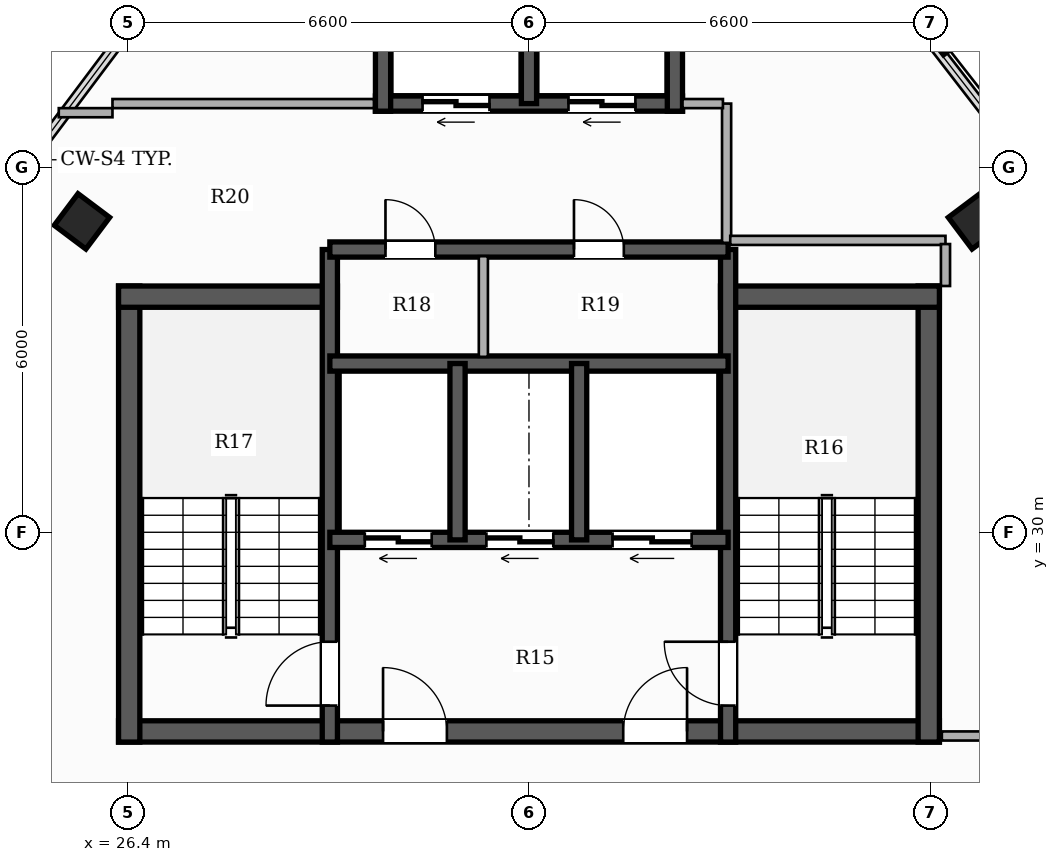
"""IFC4 building model, lengths in metres.
Left out: names, types, materials, properties, quantities, classifications, styles, units other than length and angle.
Written with IfcOpenShell. Run it as: python <this file> out.ifc"""

import sys

from ifc_helpers import new_model, si_unit, direction, frame, frame_2d, origin, origin_2d, place, context, subcontext, project, spatial, rectangle, hollow_rectangle, extrude, element, fill, save


model = new_model("IFC4")
c1 = context("Model", 3, precision=1e-05, world=origin(), true_north=direction((0.0, 1.0)))
c2 = subcontext(c1, "Body", "Model", "MODEL_VIEW")
j1 = project(units=[si_unit("LENGTHUNIT", "METRE"), si_unit("PLANEANGLEUNIT", "RADIAN")], contexts=[c1])
p1 = place(None, origin())
s1 = spatial("IfcSite", under=j1, at=p1, CompositionType="ELEMENT")
p2 = place(p1, origin())
s2 = spatial("IfcBuilding", under=s1, at=p2, CompositionType="ELEMENT")
p3 = place(p2, frame((0.0, 0.0, 260.15)))
s3 = spatial("IfcBuildingStorey", under=s2, at=p3, CompositionType="ELEMENT", Elevation=260.15)
p4 = place(p3, frame((26.25, 26.725, 0.0), z_axis=(0.0, 0.0, 1.0), x_axis=(1.0, 0.0, 0.0)))
e1 = element("IfcWall", 1, at=p4, inside=s3, PredefinedType="SHEAR", context=c2, shape_type="SweptSolid", body=[
    extrude(rectangle(XDim=13.5, YDim=0.35, at=frame_2d((6.75, 0.0))), origin(), (0.0, 0.0, 1.0), 3.3),
])
p5 = place(p4, frame((4.35, 0.0, 0.0)))
e2 = element("IfcOpeningElement", 2, at=p5, cuts=e1, PredefinedType="OPENING", context=c2, shape_type="SweptSolid", body=[
    extrude(rectangle(XDim=1.05, YDim=2.15, at=frame_2d((0.525, 1.075))), frame((0.0, 0.185, 0.0), z_axis=(0.0, -1.0, 0.0), x_axis=(1.0, 0.0, 0.0)), (0.0, 0.0, 1.0), 0.37),
])
p6 = place(p4, frame((8.3, 0.0, 0.0)))
e3 = element("IfcOpeningElement", 3, at=p6, cuts=e1, PredefinedType="OPENING", context=c2, shape_type="SweptSolid", body=[
    extrude(rectangle(XDim=1.05, YDim=2.15, at=frame_2d((0.525, 1.075))), frame((0.0, 0.185, 0.0), z_axis=(0.0, -1.0, 0.0), x_axis=(1.0, 0.0, 0.0)), (0.0, 0.0, 1.0), 0.37),
])
p7 = place(p3, frame((26.425, 26.55, 0.0), z_axis=(0.0, 0.0, 1.0), x_axis=(0.0, 1.0, 0.0)))
e4 = element("IfcWall", 4, at=p7, inside=s3, PredefinedType="SHEAR", context=c2, shape_type="SweptSolid", body=[
    extrude(rectangle(XDim=7.5, YDim=0.35, at=frame_2d((3.75, 0.0))), origin(), (0.0, 0.0, 1.0), 3.3),
])
p8 = place(p3, frame((26.25, 33.875, 0.0), z_axis=(0.0, 0.0, 1.0), x_axis=(1.0, 0.0, 0.0)))
e5 = element("IfcWall", 5, at=p8, inside=s3, PredefinedType="SHEAR", context=c2, shape_type="SweptSolid", body=[
    extrude(rectangle(XDim=3.6, YDim=0.35, at=frame_2d((1.8, 0.0))), origin(), (0.0, 0.0, 1.0), 3.3),
])
p9 = place(p3, frame((39.575, 26.55, 0.0), z_axis=(0.0, 0.0, 1.0), x_axis=(0.0, 1.0, 0.0)))
e6 = element("IfcWall", 6, at=p9, inside=s3, PredefinedType="SHEAR", context=c2, shape_type="SweptSolid", body=[
    extrude(rectangle(XDim=7.5, YDim=0.35, at=frame_2d((3.75, 0.0))), origin(), (0.0, 0.0, 1.0), 3.3),
])
p10 = place(p3, frame((36.15, 33.875, 0.0), z_axis=(0.0, 0.0, 1.0), x_axis=(1.0, 0.0, 0.0)))
e7 = element("IfcWall", 7, at=p10, inside=s3, PredefinedType="SHEAR", context=c2, shape_type="SweptSolid", body=[
    extrude(rectangle(XDim=3.6, YDim=0.35, at=frame_2d((1.8, 0.0))), origin(), (0.0, 0.0, 1.0), 3.3),
])
p11 = place(p3, frame((29.725, 26.55, 0.0), z_axis=(0.0, 0.0, 1.0), x_axis=(0.0, 1.0, 0.0)))
e8 = element("IfcWall", 8, at=p11, inside=s3, PredefinedType="SHEAR", context=c2, shape_type="SweptSolid", body=[
    extrude(rectangle(XDim=8.1, YDim=0.25, at=frame_2d((4.05, 0.0))), origin(), (0.0, 0.0, 1.0), 3.3),
])
p12 = place(p11, frame((0.6, 0.0, 0.0)))
e9 = element("IfcOpeningElement", 9, at=p12, cuts=e8, PredefinedType="OPENING", context=c2, shape_type="SweptSolid", body=[
    extrude(rectangle(XDim=1.05, YDim=2.15, at=frame_2d((0.525, 1.075))), frame((0.0, 0.135, 0.0), z_axis=(0.0, -1.0, 0.0), x_axis=(1.0, 0.0, 0.0)), (0.0, 0.0, 1.0), 0.27),
])
p13 = place(p3, frame((36.275, 26.55, 0.0), z_axis=(0.0, 0.0, 1.0), x_axis=(0.0, 1.0, 0.0)))
e10 = element("IfcWall", 10, at=p13, inside=s3, PredefinedType="SHEAR", context=c2, shape_type="SweptSolid", body=[
    extrude(rectangle(XDim=8.1, YDim=0.25, at=frame_2d((4.05, 0.0))), origin(), (0.0, 0.0, 1.0), 3.3),
])
p14 = place(p13, frame((0.6, 0.0, 0.0)))
e11 = element("IfcOpeningElement", 11, at=p14, cuts=e10, PredefinedType="OPENING", context=c2, shape_type="SweptSolid", body=[
    extrude(rectangle(XDim=1.05, YDim=2.15, at=frame_2d((0.525, 1.075))), frame((0.0, 0.135, 0.0), z_axis=(0.0, -1.0, 0.0), x_axis=(1.0, 0.0, 0.0)), (0.0, 0.0, 1.0), 0.27),
])
p15 = place(p3, frame((36.275, 29.875, 0.0), z_axis=(0.0, 0.0, 1.0), x_axis=(-1.0, 0.0, 0.0)))
e12 = element("IfcWall", 12, at=p15, inside=s3, PredefinedType="SHEAR", context=c2, shape_type="SweptSolid", body=[
    extrude(rectangle(XDim=6.55, YDim=0.25, at=frame_2d((3.275, 0.0))), origin(), (0.0, 0.0, 1.0), 3.3),
])
p16 = place(p15, frame((4.875, 0.0, 0.0)))
e13 = element("IfcOpeningElement", 13, at=p16, cuts=e12, PredefinedType="OPENING", context=c2, shape_type="SweptSolid", body=[
    extrude(rectangle(XDim=1.1, YDim=2.2, at=frame_2d((0.55, 1.1))), frame((0.0, 0.135, 0.0), z_axis=(0.0, -1.0, 0.0), x_axis=(1.0, 0.0, 0.0)), (0.0, 0.0, 1.0), 0.27),
])
p17 = place(p15, frame((2.875, 0.0, 0.0)))
e14 = element("IfcOpeningElement", 14, at=p17, cuts=e12, PredefinedType="OPENING", context=c2, shape_type="SweptSolid", body=[
    extrude(rectangle(XDim=1.1, YDim=2.2, at=frame_2d((0.55, 1.1))), frame((0.0, 0.135, 0.0), z_axis=(0.0, -1.0, 0.0), x_axis=(1.0, 0.0, 0.0)), (0.0, 0.0, 1.0), 0.27),
])
p18 = place(p15, frame((0.6, 0.0, 0.0)))
e15 = element("IfcOpeningElement", 15, at=p18, cuts=e12, PredefinedType="OPENING", context=c2, shape_type="SweptSolid", body=[
    extrude(rectangle(XDim=1.3, YDim=2.2, at=frame_2d((0.65, 1.1))), frame((0.0, 0.135, 0.0), z_axis=(0.0, -1.0, 0.0), x_axis=(1.0, 0.0, 0.0)), (0.0, 0.0, 1.0), 0.27),
])
p19 = place(p3, frame((29.725, 32.775, 0.0), z_axis=(0.0, 0.0, 1.0), x_axis=(1.0, 0.0, 0.0)))
e16 = element("IfcWall", 16, at=p19, inside=s3, PredefinedType="SHEAR", context=c2, shape_type="SweptSolid", body=[
    extrude(rectangle(XDim=6.55, YDim=0.25, at=frame_2d((3.275, 0.0))), origin(), (0.0, 0.0, 1.0), 3.3),
])
for number, where, z_axis, x_axis in (
    (17, (31.825, 29.875, 0.0), (0.0, 0.0, 1.0), (0.0, 1.0, 0.0)),
    (18, (33.825, 29.875, 0.0), (0.0, 0.0, 1.0), (0.0, 1.0, 0.0)),
):
    element("IfcWall", number, at=place(p3, frame(where, z_axis=z_axis, x_axis=x_axis)), inside=s3, PredefinedType="SHEAR", context=c2, shape_type="SweptSolid", body=[
        extrude(rectangle(XDim=2.9, YDim=0.25, at=frame_2d((1.45, 0.0))), origin(), (0.0, 0.0, 1.0), 3.3),
    ])
p20 = place(p3, frame((29.725, 34.65, 0.0), z_axis=(0.0, 0.0, 1.0), x_axis=(1.0, 0.0, 0.0)))
e19 = element("IfcWall", 19, at=p20, inside=s3, PredefinedType="SHEAR", context=c2, shape_type="SweptSolid", body=[
    extrude(rectangle(XDim=6.55, YDim=0.25, at=frame_2d((3.275, 0.0))), origin(), (0.0, 0.0, 1.0), 3.3),
])
p21 = place(p20, frame((0.915, 0.0, 0.0)))
e20 = element("IfcOpeningElement", 20, at=p21, cuts=e19, PredefinedType="OPENING", context=c2, shape_type="SweptSolid", body=[
    extrude(rectangle(XDim=0.82, YDim=2.1, at=frame_2d((0.41, 1.05))), frame((0.0, 0.135, 0.0), z_axis=(0.0, -1.0, 0.0), x_axis=(1.0, 0.0, 0.0)), (0.0, 0.0, 1.0), 0.27),
])
p22 = place(p20, frame((4.015, 0.0, 0.0)))
e21 = element("IfcOpeningElement", 21, at=p22, cuts=e19, PredefinedType="OPENING", context=c2, shape_type="SweptSolid", body=[
    extrude(rectangle(XDim=0.82, YDim=2.1, at=frame_2d((0.41, 1.05))), frame((0.0, 0.135, 0.0), z_axis=(0.0, -1.0, 0.0), x_axis=(1.0, 0.0, 0.0)), (0.0, 0.0, 1.0), 0.27),
])
p23 = place(p3, frame((35.525, 37.05, 0.0), z_axis=(0.0, 0.0, 1.0), x_axis=(-1.0, 0.0, 0.0)))
e22 = element("IfcWall", 22, at=p23, inside=s3, PredefinedType="SHEAR", context=c2, shape_type="SweptSolid", body=[
    extrude(rectangle(XDim=5.05, YDim=0.25, at=frame_2d((2.525, 0.0))), origin(), (0.0, 0.0, 1.0), 3.3),
])
p24 = place(p23, frame((3.175, 0.0, 0.0)))
e23 = element("IfcOpeningElement", 23, at=p24, cuts=e22, PredefinedType="OPENING", context=c2, shape_type="SweptSolid", body=[
    extrude(rectangle(XDim=1.1, YDim=2.2, at=frame_2d((0.55, 1.1))), frame((0.0, 0.135, 0.0), z_axis=(0.0, -1.0, 0.0), x_axis=(1.0, 0.0, 0.0)), (0.0, 0.0, 1.0), 0.27),
])
p25 = place(p23, frame((0.775, 0.0, 0.0)))
e24 = element("IfcOpeningElement", 24, at=p25, cuts=e22, PredefinedType="OPENING", context=c2, shape_type="SweptSolid", body=[
    extrude(rectangle(XDim=1.1, YDim=2.2, at=frame_2d((0.55, 1.1))), frame((0.0, 0.135, 0.0), z_axis=(0.0, -1.0, 0.0), x_axis=(1.0, 0.0, 0.0)), (0.0, 0.0, 1.0), 0.27),
])
for number, where, z_axis, x_axis in (
    (25, (30.6, 36.925, 0.0), (0.0, 0.0, 1.0), (0.0, 1.0, 0.0)),
    (26, (35.4, 36.925, 0.0), (0.0, 0.0, 1.0), (0.0, 1.0, 0.0)),
):
    element("IfcWall", number, at=place(p3, frame(where, z_axis=z_axis, x_axis=x_axis)), inside=s3, PredefinedType="SHEAR", context=c2, shape_type="SweptSolid", body=[
        extrude(rectangle(XDim=2.8, YDim=0.25, at=frame_2d((1.4, 0.0))), origin(), (0.0, 0.0, 1.0), 3.3),
    ])
p26 = place(p3, frame((33.0, 37.05, 0.0), z_axis=(0.0, 0.0, 1.0), x_axis=(0.0, 1.0, 0.0)))
e27 = element("IfcWall", 27, at=p26, inside=s3, PredefinedType="SHEAR", context=c2, shape_type="SweptSolid", body=[
    extrude(rectangle(XDim=2.55, YDim=0.25, at=frame_2d((1.275, 0.0))), origin(), (0.0, 0.0, 1.0), 3.3),
])
for number, where, z_axis, x_axis in (
    (28, (25.648, 35.113, 0.0), (0.0, 0.0, 1.0), (0.6, 0.8, 0.0)),
    (29, (40.352, 35.113, 0.0), (0.0, 0.0, 1.0), (-0.6, 0.8, 0.0)),
):
    element("IfcColumn", number, at=place(p3, frame(where, z_axis=z_axis, x_axis=x_axis)), inside=s3, PredefinedType="COLUMN", context=c2, shape_type="SweptSolid", body=[
        extrude(hollow_rectangle(XDim=0.65, YDim=0.65, WallThickness=0.022, at=origin_2d()), origin(), (0.0, 0.0, 1.0), 3.3),
    ])
p27 = place(p3, frame((36.25, 34.76, 0.0), z_axis=(0.0, 0.0, 1.0), x_axis=(0.0, 1.0, 0.0)))
e30 = element("IfcWall", 30, at=p27, inside=s3, PredefinedType="PARTITIONING", context=c2, shape_type="SweptSolid", body=[
    extrude(rectangle(XDim=2.29, YDim=0.15, at=frame_2d((1.145, 0.0))), origin(), (0.0, 0.0, 1.0), 2.425),
])
p28 = place(p3, frame((35.525, 37.05, 0.0), z_axis=(0.0, 0.0, 1.0), x_axis=(1.0, 0.0, 0.0)))
e31 = element("IfcWall", 31, at=p28, inside=s3, PredefinedType="PARTITIONING", context=c2, shape_type="SweptSolid", body=[
    extrude(rectangle(XDim=0.665, YDim=0.15, at=frame_2d((0.333, 0.0))), origin(), (0.0, 0.0, 1.0), 2.425),
])
p29 = place(p3, frame((32.25, 32.885, 0.0), z_axis=(0.0, 0.0, 1.0), x_axis=(0.0, 1.0, 0.0)))
e32 = element("IfcWall", 32, at=p29, inside=s3, PredefinedType="PARTITIONING", context=c2, shape_type="SweptSolid", body=[
    extrude(rectangle(XDim=1.655, YDim=0.15, at=frame_2d((0.828, 0.0))), origin(), (0.0, 0.0, 1.0), 3.06),
])
p30 = place(p3, frame((25.267, 36.9, 0.0), z_axis=(0.0, 0.0, 1.0), x_axis=(1.0, 0.0, 0.0)))
e33 = element("IfcWall", 33, at=p30, inside=s3, PredefinedType="PARTITIONING", context=c2, shape_type="SweptSolid", body=[
    extrude(rectangle(XDim=0.883, YDim=0.15, at=frame_2d((0.441, 0.0))), origin(), (0.0, 0.0, 1.0), 3.06),
])
p31 = place(p3, frame((39.79, 26.65, 0.0), z_axis=(0.0, 0.0, 1.0), x_axis=(1.0, 0.0, 0.0)))
e34 = element("IfcWall", 34, at=p31, inside=s3, PredefinedType="PARTITIONING", context=c2, shape_type="SweptSolid", body=[
    extrude(rectangle(XDim=2.46, YDim=0.15, at=frame_2d((1.23, 0.0))), origin(), (0.0, 0.0, 1.0), 2.565),
])
p32 = place(p3, frame((26.15, 37.05, 0.0), z_axis=(0.0, 0.0, 1.0), x_axis=(1.0, 0.0, 0.0)))
e35 = element("IfcWall", 35, at=p32, inside=s3, PredefinedType="PARTITIONING", context=c2, shape_type="SweptSolid", body=[
    extrude(rectangle(XDim=4.3, YDim=0.15, at=frame_2d((2.15, 0.0))), origin(), (0.0, 0.0, 1.0), 2.425),
])
p33 = place(p3, frame((36.31, 34.8, 0.0), z_axis=(0.0, 0.0, 1.0), x_axis=(1.0, 0.0, 0.0)))
e36 = element("IfcWall", 36, at=p33, inside=s3, PredefinedType="PARTITIONING", context=c2, shape_type="SweptSolid", body=[
    extrude(rectangle(XDim=3.54, YDim=0.15, at=frame_2d((1.77, 0.0))), origin(), (0.0, 0.0, 1.0), 2.425),
])
p34 = place(p3, frame((39.85, 34.74, 0.0), z_axis=(0.0, 0.0, 1.0), x_axis=(0.0, -1.0, 0.0)))
e37 = element("IfcWall", 37, at=p34, inside=s3, PredefinedType="PARTITIONING", context=c2, shape_type="SweptSolid", body=[
    extrude(rectangle(XDim=0.69, YDim=0.15, at=frame_2d((0.345, 0.0))), origin(), (0.0, 0.0, 1.0), 2.773),
])
p35 = place(p12, origin())
e38 = element("IfcDoor", 38, at=p35, inside=s3, OperationType="SINGLE_SWING_LEFT", PredefinedType="DOOR", context=c2, shape_type="SweptSolid", body=[
    extrude(rectangle(XDim=1.05, YDim=2.15, at=frame_2d((0.525, 1.075))), frame((0.0, 0.025, 0.0), z_axis=(0.0, -1.0, 0.0), x_axis=(1.0, 0.0, 0.0)), (0.0, 0.0, 1.0), 0.05),
])
fill(e9, e38)
p36 = place(p14, origin())
e39 = element("IfcDoor", 39, at=p36, inside=s3, OperationType="SINGLE_SWING_RIGHT", PredefinedType="DOOR", context=c2, shape_type="SweptSolid", body=[
    extrude(rectangle(XDim=1.05, YDim=2.15, at=frame_2d((0.525, 1.075))), frame((0.0, 0.025, 0.0), z_axis=(0.0, -1.0, 0.0), x_axis=(1.0, 0.0, 0.0)), (0.0, 0.0, 1.0), 0.05),
])
fill(e11, e39)
p37 = place(p5, origin())
e40 = element("IfcDoor", 40, at=p37, inside=s3, OperationType="SINGLE_SWING_LEFT", PredefinedType="DOOR", context=c2, shape_type="SweptSolid", body=[
    extrude(rectangle(XDim=1.05, YDim=2.15, at=frame_2d((0.525, 1.075))), frame((0.0, 0.025, 0.0), z_axis=(0.0, -1.0, 0.0), x_axis=(1.0, 0.0, 0.0)), (0.0, 0.0, 1.0), 0.05),
])
fill(e2, e40)
p38 = place(p6, origin())
e41 = element("IfcDoor", 41, at=p38, inside=s3, OperationType="SINGLE_SWING_RIGHT", PredefinedType="DOOR", context=c2, shape_type="SweptSolid", body=[
    extrude(rectangle(XDim=1.05, YDim=2.15, at=frame_2d((0.525, 1.075))), frame((0.0, 0.025, 0.0), z_axis=(0.0, -1.0, 0.0), x_axis=(1.0, 0.0, 0.0)), (0.0, 0.0, 1.0), 0.05),
])
fill(e3, e41)
p39 = place(p16, origin())
e42 = element("IfcDoor", 42, at=p39, inside=s3, OperationType="DOUBLE_DOOR_SLIDING", PredefinedType="DOOR", context=c2, shape_type="SweptSolid", body=[
    extrude(rectangle(XDim=1.1, YDim=2.2, at=frame_2d((0.55, 1.1))), frame((0.0, 0.025, 0.0), z_axis=(0.0, -1.0, 0.0), x_axis=(1.0, 0.0, 0.0)), (0.0, 0.0, 1.0), 0.05),
])
fill(e13, e42)
p40 = place(p17, origin())
e43 = element("IfcDoor", 43, at=p40, inside=s3, OperationType="DOUBLE_DOOR_SLIDING", PredefinedType="DOOR", context=c2, shape_type="SweptSolid", body=[
    extrude(rectangle(XDim=1.1, YDim=2.2, at=frame_2d((0.55, 1.1))), frame((0.0, 0.025, 0.0), z_axis=(0.0, -1.0, 0.0), x_axis=(1.0, 0.0, 0.0)), (0.0, 0.0, 1.0), 0.05),
])
fill(e14, e43)
p41 = place(p18, origin())
e44 = element("IfcDoor", 44, at=p41, inside=s3, OperationType="DOUBLE_DOOR_SLIDING", PredefinedType="DOOR", context=c2, shape_type="SweptSolid", body=[
    extrude(rectangle(XDim=1.3, YDim=2.2, at=frame_2d((0.65, 1.1))), frame((0.0, 0.025, 0.0), z_axis=(0.0, -1.0, 0.0), x_axis=(1.0, 0.0, 0.0)), (0.0, 0.0, 1.0), 0.05),
])
fill(e15, e44)
p42 = place(p24, origin())
e45 = element("IfcDoor", 45, at=p42, inside=s3, OperationType="DOUBLE_DOOR_SLIDING", PredefinedType="DOOR", context=c2, shape_type="SweptSolid", body=[
    extrude(rectangle(XDim=1.1, YDim=2.2, at=frame_2d((0.55, 1.1))), frame((0.0, 0.025, 0.0), z_axis=(0.0, -1.0, 0.0), x_axis=(1.0, 0.0, 0.0)), (0.0, 0.0, 1.0), 0.05),
])
fill(e23, e45)
p43 = place(p25, origin())
e46 = element("IfcDoor", 46, at=p43, inside=s3, OperationType="DOUBLE_DOOR_SLIDING", PredefinedType="DOOR", context=c2, shape_type="SweptSolid", body=[
    extrude(rectangle(XDim=1.1, YDim=2.2, at=frame_2d((0.55, 1.1))), frame((0.0, 0.025, 0.0), z_axis=(0.0, -1.0, 0.0), x_axis=(1.0, 0.0, 0.0)), (0.0, 0.0, 1.0), 0.05),
])
fill(e24, e46)
p44 = place(p21, origin())
e47 = element("IfcDoor", 47, at=p44, inside=s3, OperationType="SINGLE_SWING_LEFT", PredefinedType="DOOR", context=c2, shape_type="SweptSolid", body=[
    extrude(rectangle(XDim=0.82, YDim=2.1, at=frame_2d((0.41, 1.05))), frame((0.0, 0.025, 0.0), z_axis=(0.0, -1.0, 0.0), x_axis=(1.0, 0.0, 0.0)), (0.0, 0.0, 1.0), 0.05),
])
fill(e20, e47)
p45 = place(p22, origin())
e48 = element("IfcDoor", 48, at=p45, inside=s3, OperationType="SINGLE_SWING_LEFT", PredefinedType="DOOR", context=c2, shape_type="SweptSolid", body=[
    extrude(rectangle(XDim=0.82, YDim=2.1, at=frame_2d((0.41, 1.05))), frame((0.0, 0.025, 0.0), z_axis=(0.0, -1.0, 0.0), x_axis=(1.0, 0.0, 0.0)), (0.0, 0.0, 1.0), 0.05),
])
fill(e21, e48)
save(model, sys.argv[1])
